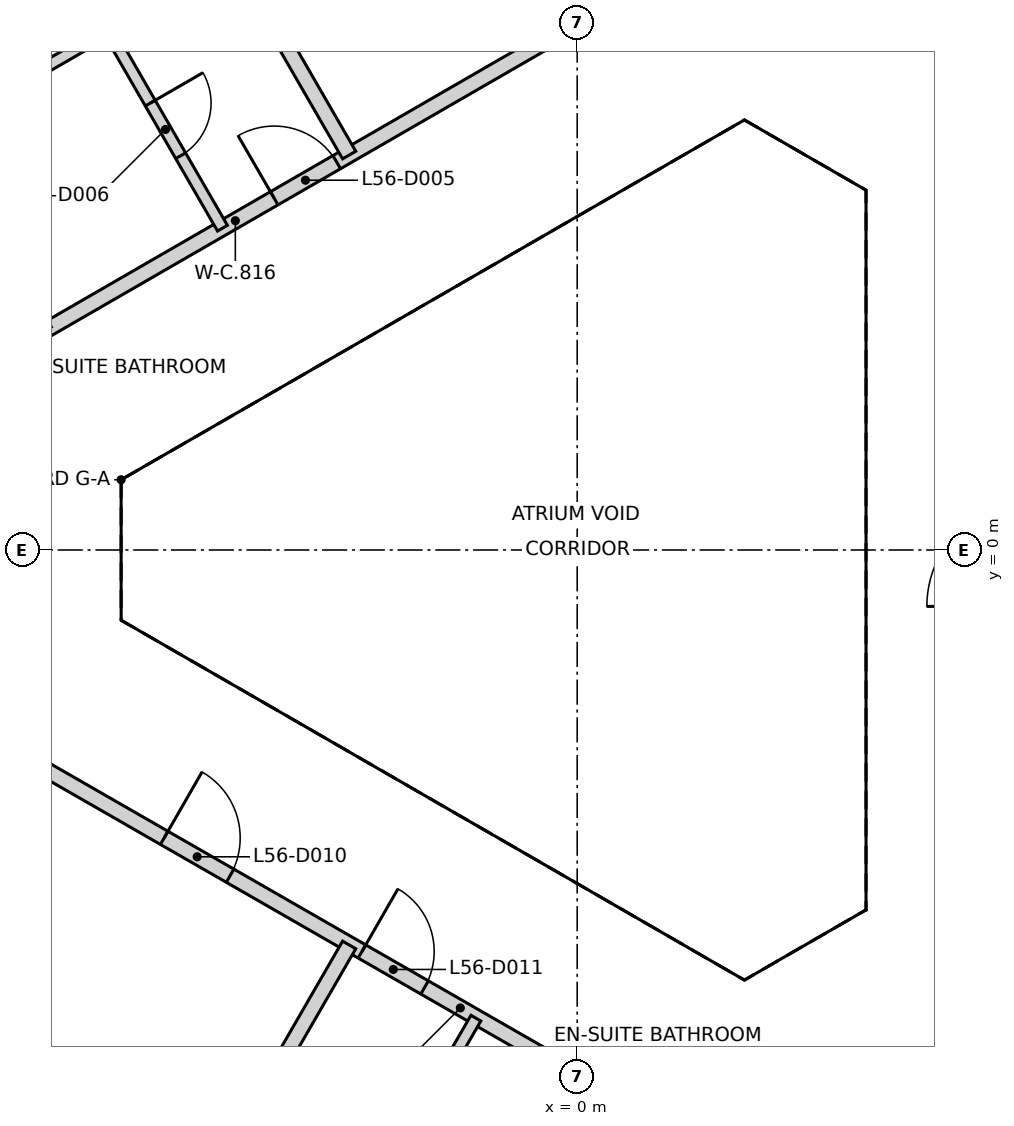
"""IFC4 building model, lengths in metres.
Left out: names, types, materials, properties, quantities, classifications, styles, units other than length and angle.
Written with IfcOpenShell. Run it as: python <this file> out.ifc"""

import sys

from ifc_helpers import new_model, si_unit, direction, frame, frame_2d, origin, place, context, subcontext, project, spatial, rectangle, extrude, element, fill, save


model = new_model("IFC4")
c1 = context("Model", 3, precision=1e-05, world=origin(), true_north=direction((0.0, 1.0)))
c2 = subcontext(c1, "Body", "Model", "MODEL_VIEW")
j1 = project(units=[si_unit("LENGTHUNIT", "METRE"), si_unit("PLANEANGLEUNIT", "RADIAN")], contexts=[c1])
p1 = place(None, origin())
s1 = spatial("IfcSite", under=j1, at=p1, CompositionType="ELEMENT")
p2 = place(p1, origin())
s2 = spatial("IfcBuilding", under=s1, at=p2, CompositionType="ELEMENT")
p3 = place(p2, frame((0.0, 0.0, 225.0)))
s3 = spatial("IfcBuildingStorey", under=s2, at=p3, CompositionType="ELEMENT", Elevation=225.0)
p4 = place(p3, frame((10.42, 6.498, 0.0), z_axis=(0.0, 0.0, 1.0), x_axis=(-0.866021906294, 0.500006057782, 0.0)))
e1 = element("IfcWall", 1, at=p4, inside=s3, PredefinedType="SHEAR", context=c2, shape_type="SweptSolid", body=[
    extrude(rectangle(XDim=11.55, YDim=0.25, at=frame_2d((5.775, 0.0))), origin(), (0.0, 0.0, 1.0), 3.25),
])
p5 = place(p4, frame((10.025, 0.0, 0.0)))
e2 = element("IfcOpeningElement", 2, at=p5, cuts=e1, PredefinedType="OPENING", context=c2, shape_type="SweptSolid", body=[
    extrude(rectangle(XDim=1.2, YDim=2.1, at=frame_2d((0.6, 1.05))), frame((0.0, 0.135, 0.0), z_axis=(0.0, -1.0, 0.0), x_axis=(1.0, 0.0, 0.0)), (0.0, 0.0, 1.0), 0.27),
])
p6 = place(p4, frame((8.725, 0.0, 0.0)))
e3 = element("IfcOpeningElement", 3, at=p6, cuts=e1, PredefinedType="OPENING", context=c2, shape_type="SweptSolid", body=[
    extrude(rectangle(XDim=1.2, YDim=2.1, at=frame_2d((0.6, 1.05))), frame((0.0, 0.135, 0.0), z_axis=(0.0, -1.0, 0.0), x_axis=(1.0, 0.0, 0.0)), (0.0, 0.0, 1.0), 0.27),
])
p7 = place(p3, frame((0.417, -12.273, 0.0), z_axis=(0.0, 0.0, 1.0), x_axis=(0.866021906294, 0.500006057782, 0.0)))
e4 = element("IfcWall", 4, at=p7, inside=s3, PredefinedType="SHEAR", context=c2, shape_type="SweptSolid", body=[
    extrude(rectangle(XDim=11.55, YDim=0.25, at=frame_2d((5.775, 0.0))), origin(), (0.0, 0.0, 1.0), 3.25),
])
p8 = place(p7, frame((10.025, 0.0, 0.0)))
e5 = element("IfcOpeningElement", 5, at=p8, cuts=e4, PredefinedType="OPENING", context=c2, shape_type="SweptSolid", body=[
    extrude(rectangle(XDim=1.2, YDim=2.1, at=frame_2d((0.6, 1.05))), frame((0.0, 0.135, 0.0), z_axis=(0.0, -1.0, 0.0), x_axis=(1.0, 0.0, 0.0)), (0.0, 0.0, 1.0), 0.27),
])
p9 = place(p7, frame((8.725, 0.0, 0.0)))
e6 = element("IfcOpeningElement", 6, at=p9, cuts=e4, PredefinedType="OPENING", context=c2, shape_type="SweptSolid", body=[
    extrude(rectangle(XDim=1.2, YDim=2.1, at=frame_2d((0.6, 1.05))), frame((0.0, 0.135, 0.0), z_axis=(0.0, -1.0, 0.0), x_axis=(1.0, 0.0, 0.0)), (0.0, 0.0, 1.0), 0.27),
])
p10 = place(p3, frame((-10.0, 1.155, 0.0), z_axis=(0.0, 0.0, 1.0), x_axis=(0.866014095592, 0.500019585852, 0.0)))
e7 = element("IfcWall", 7, at=p10, inside=s3, PredefinedType="PARTITIONING", context=c2, shape_type="SweptSolid", body=[
    extrude(rectangle(XDim=12.708, YDim=0.2, at=frame_2d((6.354, 0.0))), origin(), (0.0, 0.0, 1.0), 3.25),
])
p11 = place(p10, frame((6.944, 0.0, 0.0)))
e8 = element("IfcOpeningElement", 8, at=p11, cuts=e7, PredefinedType="OPENING", context=c2, shape_type="SweptSolid", body=[
    extrude(rectangle(XDim=0.95, YDim=2.1, at=frame_2d((0.475, 1.05))), frame((0.0, 0.11, 0.0), z_axis=(0.0, -1.0, 0.0), x_axis=(1.0, 0.0, 0.0)), (0.0, 0.0, 1.0), 0.22),
])
p12 = place(p10, frame((0.2, 0.0, 0.0)))
e9 = element("IfcOpeningElement", 9, at=p12, cuts=e7, PredefinedType="OPENING", context=c2, shape_type="SweptSolid", body=[
    extrude(rectangle(XDim=0.95, YDim=2.1, at=frame_2d((0.475, 1.05))), frame((0.0, 0.11, 0.0), z_axis=(0.0, -1.0, 0.0), x_axis=(1.0, 0.0, 0.0)), (0.0, 0.0, 1.0), 0.22),
])
p13 = place(p3, frame((-7.089, -2.836, 0.0), z_axis=(0.0, 0.0, 1.0), x_axis=(0.867106243364, -0.498123240493, 0.0)))
e10 = element("IfcWall", 10, at=p13, inside=s3, PredefinedType="PARTITIONING", context=c2, shape_type="SweptSolid", body=[
    extrude(rectangle(XDim=12.804, YDim=0.2, at=frame_2d((6.402, 0.0))), origin(), (0.0, 0.0, 1.0), 3.25),
])
p14 = place(p13, frame((1.909, 0.0, 0.0)))
e11 = element("IfcOpeningElement", 11, at=p14, cuts=e10, PredefinedType="OPENING", context=c2, shape_type="SweptSolid", body=[
    extrude(rectangle(XDim=1.0, YDim=2.1, at=frame_2d((0.5, 1.05))), frame((0.0, 0.11, 0.0), z_axis=(0.0, -1.0, 0.0), x_axis=(1.0, 0.0, 0.0)), (0.0, 0.0, 1.0), 0.22),
])
p15 = place(p13, frame((4.91, 0.0, 0.0)))
e12 = element("IfcOpeningElement", 12, at=p15, cuts=e10, PredefinedType="OPENING", context=c2, shape_type="SweptSolid", body=[
    extrude(rectangle(XDim=0.95, YDim=2.1, at=frame_2d((0.475, 1.05))), frame((0.0, 0.11, 0.0), z_axis=(0.0, -1.0, 0.0), x_axis=(1.0, 0.0, 0.0)), (0.0, 0.0, 1.0), 0.22),
])
p16 = place(p13, frame((11.654, 0.0, 0.0)))
e13 = element("IfcOpeningElement", 13, at=p16, cuts=e10, PredefinedType="OPENING", context=c2, shape_type="SweptSolid", body=[
    extrude(rectangle(XDim=0.95, YDim=2.1, at=frame_2d((0.475, 1.05))), frame((0.0, 0.11, 0.0), z_axis=(0.0, -1.0, 0.0), x_axis=(1.0, 0.0, 0.0)), (0.0, 0.0, 1.0), 0.22),
])
for number, where, z_axis, x_axis in (
    (14, (-9.119, 15.795, 0.0), (0.0, 0.0, 1.0), (0.5, -0.866, 0.0)),
    (15, (-9.119, -15.795, 0.0), (0.0, 0.0, 1.0), (0.5, 0.866, 0.0)),
):
    element("IfcWall", number, at=place(p3, frame(where, z_axis=z_axis, x_axis=x_axis)), inside=s3, PredefinedType="PARTITIONING", context=c2, shape_type="SweptSolid", body=[
        extrude(rectangle(XDim=12.238, YDim=0.2, at=frame_2d((6.119, 0.0))), origin(), (0.0, 0.0, 1.0), 3.25),
    ])
p17 = place(p3, frame((-10.114, 4.553, 0.0), z_axis=(0.0, 0.0, 1.0), x_axis=(0.866002713795, 0.500039298155, 0.0)))
e16 = element("IfcWall", 16, at=p17, inside=s3, PredefinedType="PARTITIONING", context=c2, shape_type="SweptSolid", body=[
    extrude(rectangle(XDim=4.558, YDim=0.15, at=frame_2d((2.279, 0.0))), origin(), (0.0, 0.0, 1.0), 3.25),
])
p18 = place(p3, frame((-6.167, 6.832, 0.0), z_axis=(0.0, 0.0, 1.0), x_axis=(0.499990139034, -0.866031096941, 0.0)))
e17 = element("IfcWall", 17, at=p18, inside=s3, PredefinedType="PARTITIONING", context=c2, shape_type="SweptSolid", body=[
    extrude(rectangle(XDim=3.0, YDim=0.15, at=frame_2d((1.5, 0.0))), origin(), (0.0, 0.0, 1.0), 3.25),
])
p19 = place(p18, frame((1.1, 0.0, 0.0)))
e18 = element("IfcOpeningElement", 18, at=p19, cuts=e17, PredefinedType="OPENING", context=c2, shape_type="SweptSolid", body=[
    extrude(rectangle(XDim=0.8, YDim=2.1, at=frame_2d((0.4, 1.05))), frame((0.0, 0.085, 0.0), z_axis=(0.0, -1.0, 0.0), x_axis=(1.0, 0.0, 0.0)), (0.0, 0.0, 1.0), 0.17),
])
p20 = place(p3, frame((-2.833, -8.757, 0.0), z_axis=(0.0, 0.0, 1.0), x_axis=(0.499990139034, 0.866031096941, 0.0)))
e19 = element("IfcWall", 19, at=p20, inside=s3, PredefinedType="PARTITIONING", context=c2, shape_type="SweptSolid", body=[
    extrude(rectangle(XDim=3.0, YDim=0.15, at=frame_2d((1.5, 0.0))), origin(), (0.0, 0.0, 1.0), 3.25),
])
p21 = place(p20, frame((1.1, 0.0, 0.0)))
e20 = element("IfcOpeningElement", 20, at=p21, cuts=e19, PredefinedType="OPENING", context=c2, shape_type="SweptSolid", body=[
    extrude(rectangle(XDim=0.8, YDim=2.1, at=frame_2d((0.4, 1.05))), frame((0.0, 0.085, 0.0), z_axis=(0.0, -1.0, 0.0), x_axis=(1.0, 0.0, 0.0)), (0.0, 0.0, 1.0), 0.17),
])
p22 = place(p11, origin())
e21 = element("IfcDoor", 21, at=p22, inside=s3, OperationType="SINGLE_SWING_LEFT", PredefinedType="DOOR", context=c2, shape_type="SweptSolid", body=[
    extrude(rectangle(XDim=0.95, YDim=2.1, at=frame_2d((0.475, 1.05))), frame((0.0, 0.025, 0.0), z_axis=(0.0, -1.0, 0.0), x_axis=(1.0, 0.0, 0.0)), (0.0, 0.0, 1.0), 0.05),
])
fill(e8, e21)
p23 = place(p19, frame((0.8, 0.0, 0.0), z_axis=(0.0, 0.0, 1.0), x_axis=(-1.0, 0.0, 0.0)))
e22 = element("IfcDoor", 22, at=p23, inside=s3, OperationType="SINGLE_SWING_LEFT", PredefinedType="DOOR", context=c2, shape_type="SweptSolid", body=[
    extrude(rectangle(XDim=0.8, YDim=2.1, at=frame_2d((0.4, 1.05))), frame((0.0, 0.025, 0.0), z_axis=(0.0, -1.0, 0.0), x_axis=(1.0, 0.0, 0.0)), (0.0, 0.0, 1.0), 0.05),
])
fill(e18, e22)
p24 = place(p14, frame((1.0, 0.0, 0.0), z_axis=(0.0, 0.0, 1.0), x_axis=(-1.0, 0.0, 0.0)))
e23 = element("IfcDoor", 23, at=p24, inside=s3, OperationType="SINGLE_SWING_LEFT", PredefinedType="DOOR", context=c2, shape_type="SweptSolid", body=[
    extrude(rectangle(XDim=1.0, YDim=2.1, at=frame_2d((0.5, 1.05))), frame((0.0, 0.025, 0.0), z_axis=(0.0, -1.0, 0.0), x_axis=(1.0, 0.0, 0.0)), (0.0, 0.0, 1.0), 0.05),
])
fill(e11, e23)
p25 = place(p15, frame((0.95, 0.0, 0.0), z_axis=(0.0, 0.0, 1.0), x_axis=(-1.0, 0.0, 0.0)))
e24 = element("IfcDoor", 24, at=p25, inside=s3, OperationType="SINGLE_SWING_LEFT", PredefinedType="DOOR", context=c2, shape_type="SweptSolid", body=[
    extrude(rectangle(XDim=0.95, YDim=2.1, at=frame_2d((0.475, 1.05))), frame((0.0, 0.025, 0.0), z_axis=(0.0, -1.0, 0.0), x_axis=(1.0, 0.0, 0.0)), (0.0, 0.0, 1.0), 0.05),
])
fill(e12, e24)
save(model, sys.argv[1])
